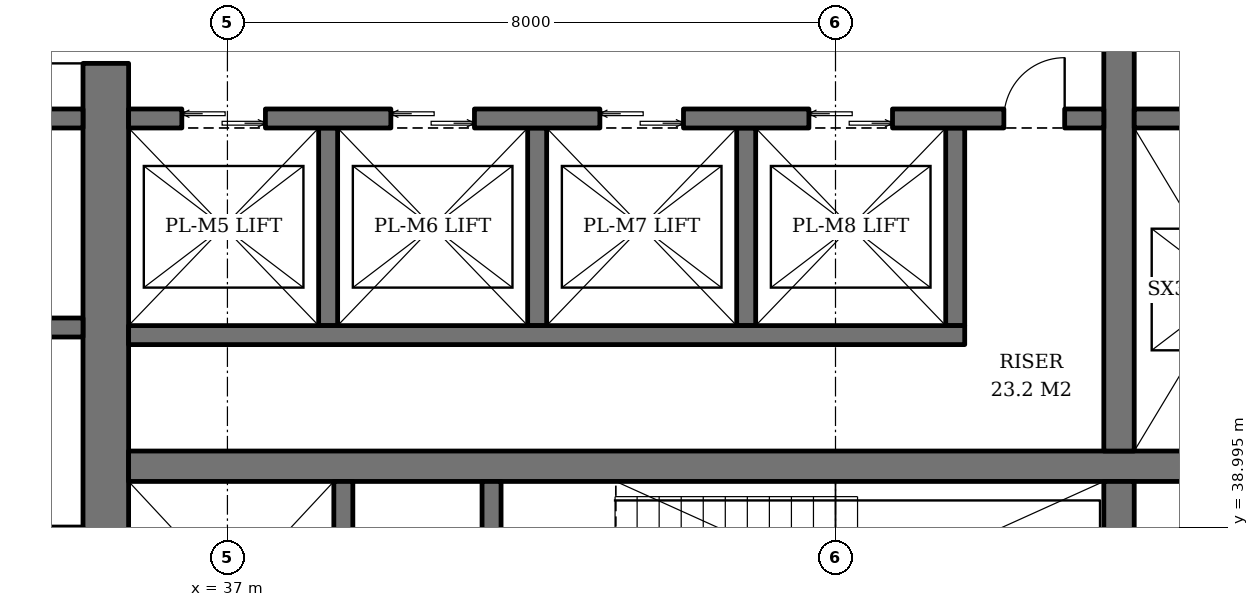
"""IFC4 building model, lengths in metres.
Left out: names, types, materials, properties, quantities, classifications, styles, units other than length and angle.
Written with IfcOpenShell. Run it as: python <this file> out.ifc"""

import sys

from ifc_helpers import new_model, si_unit, direction, frame, frame_2d, origin, place, context, subcontext, project, spatial, rectangle, extrude, element, fill, save


model = new_model("IFC4")
c1 = context("Model", 3, precision=1e-05, world=origin(), true_north=direction((0.0, 1.0)))
c2 = subcontext(c1, "Body", "Model", "MODEL_VIEW")
j1 = project(units=[si_unit("LENGTHUNIT", "METRE"), si_unit("PLANEANGLEUNIT", "RADIAN")], contexts=[c1])
p1 = place(None, origin())
s1 = spatial("IfcSite", under=j1, at=p1, CompositionType="ELEMENT")
p2 = place(p1, origin())
s2 = spatial("IfcBuilding", under=s1, at=p2, CompositionType="ELEMENT")
p3 = place(p2, frame((0.0, 0.0, 142.6)))
s3 = spatial("IfcBuildingStorey", under=s2, at=p3, CompositionType="ELEMENT", Elevation=142.6)
p4 = place(p3, frame((35.4, 36.7, 0.0), z_axis=(0.0, 0.0, 1.0), x_axis=(0.0, 1.0, 0.0)))
e1 = element("IfcWall", 1, at=p4, inside=s3, PredefinedType="SHEAR", context=c2, shape_type="SweptSolid", body=[
    extrude(rectangle(XDim=18.6, YDim=0.6, at=frame_2d((9.3, 0.0))), origin(), (0.0, 0.0, 1.0), 3.8),
])
p5 = place(p4, frame((8.4, 0.0, 0.0)))
e2 = element("IfcOpeningElement", 2, at=p5, cuts=e1, PredefinedType="OPENING", context=c2, shape_type="SweptSolid", body=[
    extrude(rectangle(XDim=1.8, YDim=2.4, at=frame_2d((0.9, 1.2))), frame((0.0, 0.31, 0.0), z_axis=(0.0, -1.0, 0.0), x_axis=(1.0, 0.0, 0.0)), (0.0, 0.0, 1.0), 0.62),
])
p6 = place(p3, frame((35.7, 39.8, 0.0), z_axis=(0.0, 0.0, 1.0), x_axis=(1.0, 0.0, 0.0)))
e3 = element("IfcWall", 3, at=p6, inside=s3, PredefinedType="SHEAR", context=c2, shape_type="SweptSolid", body=[
    extrude(rectangle(XDim=18.6, YDim=0.4, at=frame_2d((9.3, 0.0))), origin(), (0.0, 0.0, 1.0), 3.8),
])
p7 = place(p3, frame((48.73, 36.7, 0.0), z_axis=(0.0, 0.0, 1.0), x_axis=(0.0, 1.0, 0.0)))
e4 = element("IfcWall", 4, at=p7, inside=s3, PredefinedType="SHEAR", context=c2, shape_type="SweptSolid", body=[
    extrude(rectangle(XDim=2.9, YDim=0.4, at=frame_2d((1.45, 0.0))), origin(), (0.0, 0.0, 1.0), 3.8),
])
p8 = place(p3, frame((48.73, 40.0, 0.0), z_axis=(0.0, 0.0, 1.0), x_axis=(0.0, 1.0, 0.0)))
e5 = element("IfcWall", 5, at=p8, inside=s3, PredefinedType="SHEAR", context=c2, shape_type="SweptSolid", body=[
    extrude(rectangle(XDim=12.0, YDim=0.4, at=frame_2d((6.0, 0.0))), origin(), (0.0, 0.0, 1.0), 3.8),
])
p9 = place(p3, frame((38.525, 36.7, 0.0), z_axis=(0.0, 0.0, 1.0), x_axis=(0.0, 1.0, 0.0)))
e6 = element("IfcWall", 6, at=p9, inside=s3, PredefinedType="SHEAR", context=c2, shape_type="SweptSolid", body=[
    extrude(rectangle(XDim=2.9, YDim=0.25, at=frame_2d((1.45, 0.0))), origin(), (0.0, 0.0, 1.0), 3.8),
])
p10 = place(p9, frame((0.8, 0.0, 0.0)))
e7 = element("IfcOpeningElement", 7, at=p10, cuts=e6, PredefinedType="OPENING", context=c2, shape_type="SweptSolid", body=[
    extrude(rectangle(XDim=1.3, YDim=2.2, at=frame_2d((0.65, 1.1))), frame((0.0, 0.135, 0.0), z_axis=(0.0, -1.0, 0.0), x_axis=(1.0, 0.0, 0.0)), (0.0, 0.0, 1.0), 0.27),
])
p11 = place(p3, frame((40.475, 36.7, 0.0), z_axis=(0.0, 0.0, 1.0), x_axis=(0.0, 1.0, 0.0)))
e8 = element("IfcWall", 8, at=p11, inside=s3, PredefinedType="SHEAR", context=c2, shape_type="SweptSolid", body=[
    extrude(rectangle(XDim=2.9, YDim=0.25, at=frame_2d((1.45, 0.0))), origin(), (0.0, 0.0, 1.0), 3.8),
])
p12 = place(p11, frame((0.75, 0.0, 0.0)))
e9 = element("IfcOpeningElement", 9, at=p12, cuts=e8, PredefinedType="OPENING", context=c2, shape_type="SweptSolid", body=[
    extrude(rectangle(XDim=1.2, YDim=2.1, at=frame_2d((0.6, 1.05))), frame((0.0, 0.135, 0.0), z_axis=(0.0, -1.0, 0.0), x_axis=(1.0, 0.0, 0.0)), (0.0, 0.0, 1.0), 0.27),
])
for number, where, z_axis, x_axis in (
    (10, (38.325, 44.25, 0.0), (0.0, 0.0, 1.0), (0.0, -1.0, 0.0)),
    (11, (41.075, 44.25, 0.0), (0.0, 0.0, 1.0), (0.0, -1.0, 0.0)),
    (12, (43.825, 44.25, 0.0), (0.0, 0.0, 1.0), (0.0, -1.0, 0.0)),
    (13, (46.575, 44.25, 0.0), (0.0, 0.0, 1.0), (0.0, -1.0, 0.0)),
):
    element("IfcWall", number, at=place(p3, frame(where, z_axis=z_axis, x_axis=x_axis)), inside=s3, PredefinedType="SHEAR", context=c2, shape_type="SweptSolid", body=[
        extrude(rectangle(XDim=2.6, YDim=0.25, at=frame_2d((1.3, 0.0))), origin(), (0.0, 0.0, 1.0), 3.8),
    ])
p13 = place(p3, frame((35.7, 41.525, 0.0), z_axis=(0.0, 0.0, 1.0), x_axis=(1.0, 0.0, 0.0)))
e14 = element("IfcWall", 14, at=p13, inside=s3, PredefinedType="SHEAR", context=c2, shape_type="SweptSolid", body=[
    extrude(rectangle(XDim=11.0, YDim=0.25, at=frame_2d((5.5, 0.0))), origin(), (0.0, 0.0, 1.0), 3.8),
])
p14 = place(p3, frame((35.7, 44.375, 0.0), z_axis=(0.0, 0.0, 1.0), x_axis=(1.0, 0.0, 0.0)))
e15 = element("IfcWall", 15, at=p14, inside=s3, PredefinedType="SHEAR", context=c2, shape_type="SweptSolid", body=[
    extrude(rectangle(XDim=12.83, YDim=0.25, at=frame_2d((6.415, 0.0))), origin(), (0.0, 0.0, 1.0), 3.8),
])
p15 = place(p14, frame((0.7, 0.0, 0.0)))
e16 = element("IfcOpeningElement", 16, at=p15, cuts=e15, PredefinedType="OPENING", context=c2, shape_type="SweptSolid", body=[
    extrude(rectangle(XDim=1.1, YDim=2.2, at=frame_2d((0.55, 1.1))), frame((0.0, 0.135, 0.0), z_axis=(0.0, -1.0, 0.0), x_axis=(1.0, 0.0, 0.0)), (0.0, 0.0, 1.0), 0.27),
])
p16 = place(p14, frame((3.45, 0.0, 0.0)))
e17 = element("IfcOpeningElement", 17, at=p16, cuts=e15, PredefinedType="OPENING", context=c2, shape_type="SweptSolid", body=[
    extrude(rectangle(XDim=1.1, YDim=2.2, at=frame_2d((0.55, 1.1))), frame((0.0, 0.135, 0.0), z_axis=(0.0, -1.0, 0.0), x_axis=(1.0, 0.0, 0.0)), (0.0, 0.0, 1.0), 0.27),
])
p17 = place(p14, frame((6.2, 0.0, 0.0)))
e18 = element("IfcOpeningElement", 18, at=p17, cuts=e15, PredefinedType="OPENING", context=c2, shape_type="SweptSolid", body=[
    extrude(rectangle(XDim=1.1, YDim=2.2, at=frame_2d((0.55, 1.1))), frame((0.0, 0.135, 0.0), z_axis=(0.0, -1.0, 0.0), x_axis=(1.0, 0.0, 0.0)), (0.0, 0.0, 1.0), 0.27),
])
p18 = place(p14, frame((8.95, 0.0, 0.0)))
e19 = element("IfcOpeningElement", 19, at=p18, cuts=e15, PredefinedType="OPENING", context=c2, shape_type="SweptSolid", body=[
    extrude(rectangle(XDim=1.1, YDim=2.2, at=frame_2d((0.55, 1.1))), frame((0.0, 0.135, 0.0), z_axis=(0.0, -1.0, 0.0), x_axis=(1.0, 0.0, 0.0)), (0.0, 0.0, 1.0), 0.27),
])
p19 = place(p14, frame((11.515, 0.0, 0.0)))
e20 = element("IfcOpeningElement", 20, at=p19, cuts=e15, PredefinedType="OPENING", context=c2, shape_type="SweptSolid", body=[
    extrude(rectangle(XDim=0.8, YDim=2.0, at=frame_2d((0.4, 1.0))), frame((0.0, 0.135, 0.0), z_axis=(0.0, -1.0, 0.0), x_axis=(1.0, 0.0, 0.0)), (0.0, 0.0, 1.0), 0.27),
])
p20 = place(p3, frame((48.93, 44.375, 0.0), z_axis=(0.0, 0.0, 1.0), x_axis=(1.0, 0.0, 0.0)))
e21 = element("IfcWall", 21, at=p20, inside=s3, PredefinedType="SHEAR", context=c2, shape_type="SweptSolid", body=[
    extrude(rectangle(XDim=5.37, YDim=0.25, at=frame_2d((2.685, 0.0))), origin(), (0.0, 0.0, 1.0), 3.8),
])
for number, where, z_axis, x_axis in (
    (22, (32.4, 41.625, 0.0), (0.0, 0.0, 1.0), (1.0, 0.0, 0.0)),
    (23, (32.4, 44.375, 0.0), (0.0, 0.0, 1.0), (1.0, 0.0, 0.0)),
):
    element("IfcWall", number, at=place(p3, frame(where, z_axis=z_axis, x_axis=x_axis)), inside=s3, PredefinedType="SHEAR", context=c2, shape_type="SweptSolid", body=[
        extrude(rectangle(XDim=2.7, YDim=0.25, at=frame_2d((1.35, 0.0))), origin(), (0.0, 0.0, 1.0), 3.8),
    ])
p21 = place(p15, origin())
e24 = element("IfcDoor", 24, at=p21, inside=s3, OperationType="DOUBLE_DOOR_SLIDING", PredefinedType="DOOR", context=c2, shape_type="SweptSolid", body=[
    extrude(rectangle(XDim=1.1, YDim=2.2, at=frame_2d((0.55, 1.1))), frame((0.0, 0.025, 0.0), z_axis=(0.0, -1.0, 0.0), x_axis=(1.0, 0.0, 0.0)), (0.0, 0.0, 1.0), 0.05),
])
fill(e16, e24)
p22 = place(p16, origin())
e25 = element("IfcDoor", 25, at=p22, inside=s3, OperationType="DOUBLE_DOOR_SLIDING", PredefinedType="DOOR", context=c2, shape_type="SweptSolid", body=[
    extrude(rectangle(XDim=1.1, YDim=2.2, at=frame_2d((0.55, 1.1))), frame((0.0, 0.025, 0.0), z_axis=(0.0, -1.0, 0.0), x_axis=(1.0, 0.0, 0.0)), (0.0, 0.0, 1.0), 0.05),
])
fill(e17, e25)
p23 = place(p17, origin())
e26 = element("IfcDoor", 26, at=p23, inside=s3, OperationType="DOUBLE_DOOR_SLIDING", PredefinedType="DOOR", context=c2, shape_type="SweptSolid", body=[
    extrude(rectangle(XDim=1.1, YDim=2.2, at=frame_2d((0.55, 1.1))), frame((0.0, 0.025, 0.0), z_axis=(0.0, -1.0, 0.0), x_axis=(1.0, 0.0, 0.0)), (0.0, 0.0, 1.0), 0.05),
])
fill(e18, e26)
p24 = place(p18, origin())
e27 = element("IfcDoor", 27, at=p24, inside=s3, OperationType="DOUBLE_DOOR_SLIDING", PredefinedType="DOOR", context=c2, shape_type="SweptSolid", body=[
    extrude(rectangle(XDim=1.1, YDim=2.2, at=frame_2d((0.55, 1.1))), frame((0.0, 0.025, 0.0), z_axis=(0.0, -1.0, 0.0), x_axis=(1.0, 0.0, 0.0)), (0.0, 0.0, 1.0), 0.05),
])
fill(e19, e27)
p25 = place(p19, origin())
e28 = element("IfcDoor", 28, at=p25, inside=s3, OperationType="SINGLE_SWING_RIGHT", PredefinedType="DOOR", context=c2, shape_type="SweptSolid", body=[
    extrude(rectangle(XDim=0.8, YDim=2.0, at=frame_2d((0.4, 1.0))), frame((0.0, 0.025, 0.0), z_axis=(0.0, -1.0, 0.0), x_axis=(1.0, 0.0, 0.0)), (0.0, 0.0, 1.0), 0.05),
])
fill(e20, e28)
p26 = place(p5, origin())
e29 = element("IfcDoor", 29, at=p26, inside=s3, OperationType="DOUBLE_DOOR_SINGLE_SWING", PredefinedType="DOOR", context=c2, shape_type="SweptSolid", body=[
    extrude(rectangle(XDim=1.8, YDim=2.4, at=frame_2d((0.9, 1.2))), frame((0.0, 0.025, 0.0), z_axis=(0.0, -1.0, 0.0), x_axis=(1.0, 0.0, 0.0)), (0.0, 0.0, 1.0), 0.05),
])
fill(e2, e29)
save(model, sys.argv[1])
